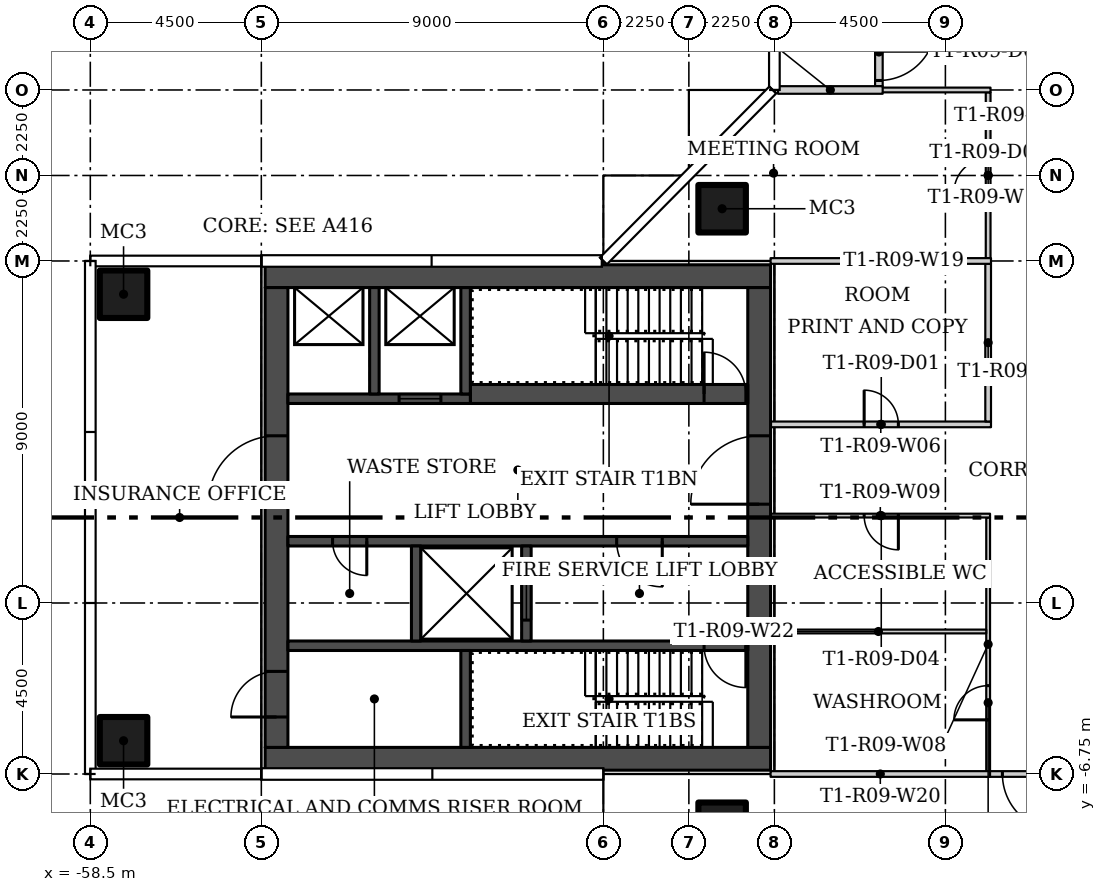
"""IFC4 building model, lengths in metres.
Left out: names, types, materials, properties, quantities, classifications, styles, units other than length and angle.
Written with IfcOpenShell. Run it as: python <this file> out.ifc"""

import sys

from ifc_helpers import new_model, si_unit, direction, frame, frame_2d, origin, origin_2d, place, context, subcontext, project, spatial, rectangle, hollow_rectangle, extrude, element, fill, save


model = new_model("IFC4")
c1 = context("Model", 3, precision=1e-05, world=origin(), true_north=direction((0.0, 1.0)))
c2 = subcontext(c1, "Body", "Model", "MODEL_VIEW")
j1 = project(units=[si_unit("LENGTHUNIT", "METRE"), si_unit("PLANEANGLEUNIT", "RADIAN")], contexts=[c1])
p1 = place(None, origin())
s1 = spatial("IfcSite", under=j1, at=p1, CompositionType="ELEMENT")
p2 = place(p1, origin())
s2 = spatial("IfcBuilding", under=s1, at=p2, CompositionType="ELEMENT")
p3 = place(p2, frame((0.0, 0.0, 89.7)))
s3 = spatial("IfcBuildingStorey", under=s2, at=p3, CompositionType="ELEMENT", Elevation=89.7)
for number, where in (
    (1, (-41.875, 8.125, 0.0)),
    (2, (-41.875, -8.125, 0.0)),
    (3, (-57.625, -5.875, 0.0)),
    (4, (-57.625, 5.875, 0.0)),
):
    element("IfcColumn", number, at=place(p3, frame(where)), inside=s3, PredefinedType="COLUMN", context=c2, shape_type="SweptSolid", body=[
        extrude(hollow_rectangle(XDim=1.25, YDim=1.25, WallThickness=0.05, at=origin_2d()), origin(), (0.0, 0.0, 1.0), 3.55),
    ])
p4 = place(p3, frame((-40.6, 2.45, 0.0)))
e5 = element("IfcWall", 5, at=p4, inside=s3, PredefinedType="PARTITIONING", context=c2, shape_type="SweptSolid", body=[
    extrude(rectangle(XDim=5.8, YDim=0.15, at=frame_2d((2.9, 0.0))), origin(), (0.0, 0.0, 1.0), 3.55),
])
p5 = place(p4, frame((2.462, 0.0, 0.0)))
e6 = element("IfcOpeningElement", 6, at=p5, cuts=e5, PredefinedType="OPENING", context=c2, shape_type="SweptSolid", body=[
    extrude(rectangle(XDim=0.9, YDim=2.1, at=frame_2d((0.45, 1.05))), frame((0.0, 0.085, 0.0), z_axis=(0.0, -1.0, 0.0), x_axis=(1.0, 0.0, 0.0)), (0.0, 0.0, 1.0), 0.17),
])
p6 = place(p3, frame((-34.875, 2.525, 0.0), z_axis=(0.0, 0.0, 1.0), x_axis=(0.0, 1.0, 0.0)))
e7 = element("IfcWall", 7, at=p6, inside=s3, PredefinedType="PARTITIONING", context=c2, shape_type="SweptSolid", body=[
    extrude(rectangle(XDim=4.15, YDim=0.15, at=frame_2d((2.075, 0.0))), origin(), (0.0, 0.0, 1.0), 3.55),
])
p7 = place(p3, frame((-34.875, -6.675, 0.0), z_axis=(0.0, 0.0, 1.0), x_axis=(0.0, 1.0, 0.0)))
e8 = element("IfcWall", 8, at=p7, inside=s3, PredefinedType="PARTITIONING", context=c2, shape_type="SweptSolid", body=[
    extrude(rectangle(XDim=6.675, YDim=0.1, at=frame_2d((3.337, 0.0))), origin(), (0.0, 0.0, 1.0), 3.55),
])
p8 = place(p7, frame((1.35, 0.0, 0.0)))
e9 = element("IfcOpeningElement", 9, at=p8, cuts=e8, PredefinedType="OPENING", context=c2, shape_type="SweptSolid", body=[
    extrude(rectangle(XDim=0.9, YDim=2.1, at=frame_2d((0.45, 1.05))), frame((0.0, 0.06, 0.0), z_axis=(0.0, -1.0, 0.0), x_axis=(1.0, 0.0, 0.0)), (0.0, 0.0, 1.0), 0.12),
])
p9 = place(p3, frame((-34.825, 0.05, 0.0), z_axis=(0.0, 0.0, 1.0), x_axis=(-1.0, 0.0, 0.0)))
e10 = element("IfcWall", 10, at=p9, inside=s3, PredefinedType="PARTITIONING", context=c2, shape_type="SweptSolid", body=[
    extrude(rectangle(XDim=5.775, YDim=0.1, at=frame_2d((2.888, 0.0))), origin(), (0.0, 0.0, 1.0), 3.55),
])
p10 = place(p9, frame((2.413, 0.0, 0.0)))
e11 = element("IfcOpeningElement", 11, at=p10, cuts=e10, PredefinedType="OPENING", context=c2, shape_type="SweptSolid", body=[
    extrude(rectangle(XDim=0.9, YDim=2.1, at=frame_2d((0.45, 1.05))), frame((0.0, 0.06, 0.0), z_axis=(0.0, -1.0, 0.0), x_axis=(1.0, 0.0, 0.0)), (0.0, 0.0, 1.0), 0.12),
])
p11 = place(p3, frame((-34.875, 6.825, 0.0), z_axis=(0.0, 0.0, 1.0), x_axis=(0.0, 1.0, 0.0)))
e12 = element("IfcWall", 12, at=p11, inside=s3, PredefinedType="PARTITIONING", context=c2, shape_type="SweptSolid", body=[
    extrude(rectangle(XDim=4.363, YDim=0.125, at=frame_2d((2.181, 0.0))), origin(), (0.0, 0.0, 1.0), 3.55),
])
p12 = place(p11, frame((1.725, 0.0, 0.0)))
e13 = element("IfcOpeningElement", 13, at=p12, cuts=e12, PredefinedType="OPENING", context=c2, shape_type="SweptSolid", body=[
    extrude(rectangle(XDim=0.9, YDim=2.1, at=frame_2d((0.45, 1.05))), frame((0.0, 0.073, 0.0), z_axis=(0.0, -1.0, 0.0), x_axis=(1.0, 0.0, 0.0)), (0.0, 0.0, 1.0), 0.145),
])
p13 = place(p3, frame((-34.812, 11.25, 0.0), z_axis=(0.0, 0.0, 1.0), x_axis=(-1.0, 0.0, 0.0)))
e14 = element("IfcWall", 14, at=p13, inside=s3, PredefinedType="PARTITIONING", context=c2, shape_type="SweptSolid", body=[
    extrude(rectangle(XDim=3.038, YDim=0.125, at=frame_2d((1.519, 0.0))), origin(), (0.0, 0.0, 1.0), 3.55),
])
p14 = place(p3, frame((-37.75, 13.15, 0.0), z_axis=(0.0, 0.0, 1.0), x_axis=(0.0, -1.0, 0.0)))
e15 = element("IfcWall", 15, at=p14, inside=s3, PredefinedType="PARTITIONING", context=c2, shape_type="SweptSolid", body=[
    extrude(rectangle(XDim=1.8, YDim=0.2, at=frame_2d((0.9, 0.0))), origin(), (0.0, 0.0, 1.0), 3.55),
])
p15 = place(p14, frame((0.15, 0.0, 0.0)))
e16 = element("IfcOpeningElement", 16, at=p15, cuts=e15, PredefinedType="OPENING", context=c2, shape_type="SweptSolid", body=[
    extrude(rectangle(XDim=1.5, YDim=2.4, at=frame_2d((0.75, 1.2))), frame((0.0, 0.11, 0.0), z_axis=(0.0, -1.0, 0.0), x_axis=(1.0, 0.0, 0.0)), (0.0, 0.0, 1.0), 0.22),
])
p16 = place(p3, frame((-32.55, -6.75, 0.0), z_axis=(0.0, 0.0, 1.0), x_axis=(-1.0, 0.0, 0.0)))
e17 = element("IfcWall", 17, at=p16, inside=s3, PredefinedType="PARTITIONING", context=c2, shape_type="SweptSolid", body=[
    extrude(rectangle(XDim=2.375, YDim=0.15, at=frame_2d((1.188, 0.0))), origin(), (0.0, 0.0, 1.0), 3.55),
])
p17 = place(p16, frame((0.45, 0.0, 0.0)))
e18 = element("IfcOpeningElement", 18, at=p17, cuts=e17, PredefinedType="OPENING", context=c2, shape_type="SweptSolid", body=[
    extrude(rectangle(XDim=1.5, YDim=2.1, at=frame_2d((0.75, 1.05))), frame((0.0, 0.085, 0.0), z_axis=(0.0, -1.0, 0.0), x_axis=(1.0, 0.0, 0.0)), (0.0, 0.0, 1.0), 0.17),
])
p18 = place(p3, frame((-34.8, 6.75, 0.0), z_axis=(0.0, 0.0, 1.0), x_axis=(-1.0, 0.0, 0.0)))
e19 = element("IfcWall", 19, at=p18, inside=s3, PredefinedType="PARTITIONING", context=c2, shape_type="SweptSolid", body=[
    extrude(rectangle(XDim=5.8, YDim=0.15, at=frame_2d((2.9, 0.0))), origin(), (0.0, 0.0, 1.0), 3.55),
])
p19 = place(p3, frame((-40.6, -6.75, 0.0)))
e20 = element("IfcWall", 20, at=p19, inside=s3, PredefinedType="PARTITIONING", context=c2, shape_type="SweptSolid", body=[
    extrude(rectangle(XDim=5.775, YDim=0.15, at=frame_2d((2.888, 0.0))), origin(), (0.0, 0.0, 1.0), 3.55),
])
p20 = place(p3, frame((-34.925, -3.0, 0.0), z_axis=(0.0, 0.0, 1.0), x_axis=(-1.0, 0.0, 0.0)))
e21 = element("IfcWall", 21, at=p20, inside=s3, PredefinedType="PARTITIONING", context=c2, shape_type="SweptSolid", body=[
    extrude(rectangle(XDim=5.675, YDim=0.1, at=frame_2d((2.837, 0.0))), origin(), (0.0, 0.0, 1.0), 3.55),
])
p21 = place(p3, frame((-37.65, 11.25, 0.0), z_axis=(0.0, 0.0, 1.0), x_axis=(-1.0, 0.0, 0.0)))
e22 = element("IfcWall", 22, at=p21, inside=s3, PredefinedType="PARTITIONING", context=c2, shape_type="SweptSolid", body=[
    extrude(rectangle(XDim=2.755, YDim=0.2, at=frame_2d((1.377, 0.0))), origin(), (0.0, 0.0, 1.0), 3.55),
])
for number, where, z_axis, x_axis in (
    (23, (-40.6, -6.35, 0.0), (0.0, 0.0, 1.0), (-1.0, 0.0, 0.0)),
    (24, (-40.6, 6.35, 0.0), (0.0, 0.0, 1.0), (-1.0, 0.0, 0.0)),
):
    element("IfcWall", number, at=place(p3, frame(where, z_axis=z_axis, x_axis=x_axis)), inside=s3, PredefinedType="SHEAR", context=c2, shape_type="SweptSolid", body=[
        extrude(rectangle(XDim=13.3, YDim=0.6, at=frame_2d((6.65, 0.0))), origin(), (0.0, 0.0, 1.0), 3.55),
    ])
p22 = place(p3, frame((-40.9, -6.05, 0.0), z_axis=(0.0, 0.0, 1.0), x_axis=(0.0, 1.0, 0.0)))
e25 = element("IfcWall", 25, at=p22, inside=s3, PredefinedType="SHEAR", context=c2, shape_type="SweptSolid", body=[
    extrude(rectangle(XDim=12.1, YDim=0.6, at=frame_2d((6.05, 0.0))), origin(), (0.0, 0.0, 1.0), 3.55),
])
p23 = place(p22, frame((6.4, 0.0, 0.0)))
e26 = element("IfcOpeningElement", 26, at=p23, cuts=e25, PredefinedType="OPENING", context=c2, shape_type="SweptSolid", body=[
    extrude(rectangle(XDim=1.8, YDim=2.4, at=frame_2d((0.9, 1.2))), frame((0.0, 0.31, 0.0), z_axis=(0.0, -1.0, 0.0), x_axis=(1.0, 0.0, 0.0)), (0.0, 0.0, 1.0), 0.62),
])
p24 = place(p3, frame((-53.6, -6.05, 0.0), z_axis=(0.0, 0.0, 1.0), x_axis=(0.0, 1.0, 0.0)))
e27 = element("IfcWall", 27, at=p24, inside=s3, PredefinedType="SHEAR", context=c2, shape_type="SweptSolid", body=[
    extrude(rectangle(XDim=12.1, YDim=0.6, at=frame_2d((6.05, 0.0))), origin(), (0.0, 0.0, 1.0), 3.55),
])
p25 = place(p24, frame((0.8, 0.0, 0.0)))
e28 = element("IfcOpeningElement", 28, at=p25, cuts=e27, PredefinedType="OPENING", context=c2, shape_type="SweptSolid", body=[
    extrude(rectangle(XDim=1.2, YDim=2.1, at=frame_2d((0.6, 1.05))), frame((0.0, 0.31, 0.0), z_axis=(0.0, -1.0, 0.0), x_axis=(1.0, 0.0, 0.0)), (0.0, 0.0, 1.0), 0.62),
])
p26 = place(p24, frame((6.4, 0.0, 0.0)))
e29 = element("IfcOpeningElement", 29, at=p26, cuts=e27, PredefinedType="OPENING", context=c2, shape_type="SweptSolid", body=[
    extrude(rectangle(XDim=1.8, YDim=2.4, at=frame_2d((0.9, 1.2))), frame((0.0, 0.31, 0.0), z_axis=(0.0, -1.0, 0.0), x_axis=(1.0, 0.0, 0.0)), (0.0, 0.0, 1.0), 0.62),
])
p27 = place(p3, frame((-41.2, -3.375, 0.0), z_axis=(0.0, 0.0, 1.0), x_axis=(-1.0, 0.0, 0.0)))
e30 = element("IfcWall", 30, at=p27, inside=s3, PredefinedType="SHEAR", context=c2, shape_type="SweptSolid", body=[
    extrude(rectangle(XDim=12.1, YDim=0.25, at=frame_2d((6.05, 0.0))), origin(), (0.0, 0.0, 1.0), 3.55),
])
p28 = place(p27, frame((0.05, 0.0, 0.0)))
e31 = element("IfcOpeningElement", 31, at=p28, cuts=e30, PredefinedType="OPENING", context=c2, shape_type="SweptSolid", body=[
    extrude(rectangle(XDim=1.1, YDim=2.1, at=frame_2d((0.55, 1.05))), frame((0.0, 0.135, 0.0), z_axis=(0.0, -1.0, 0.0), x_axis=(1.0, 0.0, 0.0)), (0.0, 0.0, 1.0), 0.27),
])
p29 = place(p3, frame((-48.625, -6.05, 0.0), z_axis=(0.0, 0.0, 1.0), x_axis=(0.0, 1.0, 0.0)))
e32 = element("IfcWall", 32, at=p29, inside=s3, PredefinedType="SHEAR", context=c2, shape_type="SweptSolid", body=[
    extrude(rectangle(XDim=2.55, YDim=0.25, at=frame_2d((1.275, 0.0))), origin(), (0.0, 0.0, 1.0), 3.55),
])
p30 = place(p3, frame((-41.2, -0.625, 0.0), z_axis=(0.0, 0.0, 1.0), x_axis=(-1.0, 0.0, 0.0)))
e33 = element("IfcWall", 33, at=p30, inside=s3, PredefinedType="SHEAR", context=c2, shape_type="SweptSolid", body=[
    extrude(rectangle(XDim=12.1, YDim=0.25, at=frame_2d((6.05, 0.0))), origin(), (0.0, 0.0, 1.0), 3.55),
])
p31 = place(p30, frame((2.25, 0.0, 0.0)))
e34 = element("IfcOpeningElement", 34, at=p31, cuts=e33, PredefinedType="OPENING", context=c2, shape_type="SweptSolid", body=[
    extrude(rectangle(XDim=1.2, YDim=2.1, at=frame_2d((0.6, 1.05))), frame((0.0, 0.135, 0.0), z_axis=(0.0, -1.0, 0.0), x_axis=(1.0, 0.0, 0.0)), (0.0, 0.0, 1.0), 0.27),
])
p32 = place(p30, frame((10.025, 0.0, 0.0)))
e35 = element("IfcOpeningElement", 35, at=p32, cuts=e33, PredefinedType="OPENING", context=c2, shape_type="SweptSolid", body=[
    extrude(rectangle(XDim=0.9, YDim=2.1, at=frame_2d((0.45, 1.05))), frame((0.0, 0.135, 0.0), z_axis=(0.0, -1.0, 0.0), x_axis=(1.0, 0.0, 0.0)), (0.0, 0.0, 1.0), 0.27),
])
p33 = place(p3, frame((-47.025, -3.25, 0.0), z_axis=(0.0, 0.0, 1.0), x_axis=(0.0, 1.0, 0.0)))
e36 = element("IfcWall", 36, at=p33, inside=s3, PredefinedType="SHEAR", context=c2, shape_type="SweptSolid", body=[
    extrude(rectangle(XDim=2.5, YDim=0.25, at=frame_2d((1.25, 0.0))), origin(), (0.0, 0.0, 1.0), 3.55),
])
p34 = place(p33, frame((0.55, 0.0, 0.0)))
e37 = element("IfcOpeningElement", 37, at=p34, cuts=e36, PredefinedType="OPENING", context=c2, shape_type="SweptSolid", body=[
    extrude(rectangle(XDim=1.4, YDim=2.4, at=frame_2d((0.7, 1.2))), frame((0.0, 0.135, 0.0), z_axis=(0.0, -1.0, 0.0), x_axis=(1.0, 0.0, 0.0)), (0.0, 0.0, 1.0), 0.27),
])
p35 = place(p3, frame((-49.925, -3.25, 0.0), z_axis=(0.0, 0.0, 1.0), x_axis=(0.0, 1.0, 0.0)))
e38 = element("IfcWall", 38, at=p35, inside=s3, PredefinedType="SHEAR", context=c2, shape_type="SweptSolid", body=[
    extrude(rectangle(XDim=2.5, YDim=0.25, at=frame_2d((1.25, 0.0))), origin(), (0.0, 0.0, 1.0), 3.55),
])
p36 = place(p3, frame((-48.5, 3.25, 0.0)))
e39 = element("IfcWall", 39, at=p36, inside=s3, PredefinedType="SHEAR", context=c2, shape_type="SweptSolid", body=[
    extrude(rectangle(XDim=7.3, YDim=0.5, at=frame_2d((3.65, 0.0))), origin(), (0.0, 0.0, 1.0), 3.55),
])
p37 = place(p36, frame((6.15, 0.0, 0.0)))
e40 = element("IfcOpeningElement", 40, at=p37, cuts=e39, PredefinedType="OPENING", context=c2, shape_type="SweptSolid", body=[
    extrude(rectangle(XDim=1.1, YDim=2.1, at=frame_2d((0.55, 1.05))), frame((0.0, 0.26, 0.0), z_axis=(0.0, -1.0, 0.0), x_axis=(1.0, 0.0, 0.0)), (0.0, 0.0, 1.0), 0.52),
])
p38 = place(p3, frame((-48.5, 3.125, 0.0), z_axis=(0.0, 0.0, 1.0), x_axis=(-1.0, 0.0, 0.0)))
e41 = element("IfcWall", 41, at=p38, inside=s3, PredefinedType="SHEAR", context=c2, shape_type="SweptSolid", body=[
    extrude(rectangle(XDim=4.8, YDim=0.25, at=frame_2d((2.4, 0.0))), origin(), (0.0, 0.0, 1.0), 3.55),
])
p39 = place(p38, frame((0.775, 0.0, 0.0)))
e42 = element("IfcOpeningElement", 42, at=p39, cuts=e41, PredefinedType="OPENING", context=c2, shape_type="SweptSolid", body=[
    extrude(rectangle(XDim=1.1, YDim=2.1, at=frame_2d((0.55, 1.05))), frame((0.0, 0.135, 0.0), z_axis=(0.0, -1.0, 0.0), x_axis=(1.0, 0.0, 0.0)), (0.0, 0.0, 1.0), 0.27),
])
for number, where, z_axis, x_axis in (
    (43, (-48.625, 3.25, 0.0), (0.0, 0.0, 1.0), (0.0, 1.0, 0.0)),
    (44, (-51.025, 3.25, 0.0), (0.0, 0.0, 1.0), (0.0, 1.0, 0.0)),
):
    element("IfcWall", number, at=place(p3, frame(where, z_axis=z_axis, x_axis=x_axis)), inside=s3, PredefinedType="SHEAR", context=c2, shape_type="SweptSolid", body=[
        extrude(rectangle(XDim=2.8, YDim=0.25, at=frame_2d((1.4, 0.0))), origin(), (0.0, 0.0, 1.0), 3.55),
    ])
p40 = place(p5, origin())
e45 = element("IfcDoor", 45, at=p40, inside=s3, OperationType="SINGLE_SWING_RIGHT", PredefinedType="DOOR", context=c2, shape_type="SweptSolid", body=[
    extrude(rectangle(XDim=0.9, YDim=2.1, at=frame_2d((0.45, 1.05))), frame((0.0, 0.025, 0.0), z_axis=(0.0, -1.0, 0.0), x_axis=(1.0, 0.0, 0.0)), (0.0, 0.0, 1.0), 0.05),
])
fill(e6, e45)
p41 = place(p15, origin())
e46 = element("IfcDoor", 46, at=p41, inside=s3, OperationType="DOUBLE_DOOR_SINGLE_SWING", PredefinedType="DOOR", context=c2, shape_type="SweptSolid", body=[
    extrude(rectangle(XDim=1.5, YDim=2.4, at=frame_2d((0.75, 1.2))), frame((0.0, 0.025, 0.0), z_axis=(0.0, -1.0, 0.0), x_axis=(1.0, 0.0, 0.0)), (0.0, 0.0, 1.0), 0.05),
])
fill(e16, e46)
p42 = place(p8, origin())
e47 = element("IfcDoor", 47, at=p42, inside=s3, OperationType="SINGLE_SWING_RIGHT", PredefinedType="DOOR", context=c2, shape_type="SweptSolid", body=[
    extrude(rectangle(XDim=0.9, YDim=2.1, at=frame_2d((0.45, 1.05))), frame((0.0, 0.025, 0.0), z_axis=(0.0, -1.0, 0.0), x_axis=(1.0, 0.0, 0.0)), (0.0, 0.0, 1.0), 0.05),
])
fill(e9, e47)
p43 = place(p10, origin())
e48 = element("IfcDoor", 48, at=p43, inside=s3, OperationType="SINGLE_SWING_LEFT", PredefinedType="DOOR", context=c2, shape_type="SweptSolid", body=[
    extrude(rectangle(XDim=0.9, YDim=2.1, at=frame_2d((0.45, 1.05))), frame((0.0, 0.025, 0.0), z_axis=(0.0, -1.0, 0.0), x_axis=(1.0, 0.0, 0.0)), (0.0, 0.0, 1.0), 0.05),
])
fill(e11, e48)
p44 = place(p12, origin())
e49 = element("IfcDoor", 49, at=p44, inside=s3, OperationType="SINGLE_SWING_LEFT", PredefinedType="DOOR", context=c2, shape_type="SweptSolid", body=[
    extrude(rectangle(XDim=0.9, YDim=2.1, at=frame_2d((0.45, 1.05))), frame((0.0, 0.025, 0.0), z_axis=(0.0, -1.0, 0.0), x_axis=(1.0, 0.0, 0.0)), (0.0, 0.0, 1.0), 0.05),
])
fill(e13, e49)
p45 = place(p17, origin())
e50 = element("IfcDoor", 50, at=p45, inside=s3, OperationType="DOUBLE_DOOR_SINGLE_SWING", PredefinedType="DOOR", context=c2, shape_type="SweptSolid", body=[
    extrude(rectangle(XDim=1.5, YDim=2.1, at=frame_2d((0.75, 1.05))), frame((0.0, 0.025, 0.0), z_axis=(0.0, -1.0, 0.0), x_axis=(1.0, 0.0, 0.0)), (0.0, 0.0, 1.0), 0.05),
])
fill(e18, e50)
p46 = place(p23, origin())
e51 = element("IfcDoor", 51, at=p46, inside=s3, OperationType="DOUBLE_DOOR_SINGLE_SWING", PredefinedType="DOOR", context=c2, shape_type="SweptSolid", body=[
    extrude(rectangle(XDim=1.8, YDim=2.4, at=frame_2d((0.9, 1.2))), frame((0.0, 0.025, 0.0), z_axis=(0.0, -1.0, 0.0), x_axis=(1.0, 0.0, 0.0)), (0.0, 0.0, 1.0), 0.05),
])
fill(e26, e51)
p47 = place(p25, origin())
e52 = element("IfcDoor", 52, at=p47, inside=s3, OperationType="SINGLE_SWING_LEFT", PredefinedType="DOOR", context=c2, shape_type="SweptSolid", body=[
    extrude(rectangle(XDim=1.2, YDim=2.1, at=frame_2d((0.6, 1.05))), frame((0.0, 0.025, 0.0), z_axis=(0.0, -1.0, 0.0), x_axis=(1.0, 0.0, 0.0)), (0.0, 0.0, 1.0), 0.05),
])
fill(e28, e52)
p48 = place(p26, origin())
e53 = element("IfcDoor", 53, at=p48, inside=s3, OperationType="DOUBLE_DOOR_SINGLE_SWING", PredefinedType="DOOR", context=c2, shape_type="SweptSolid", body=[
    extrude(rectangle(XDim=1.8, YDim=2.4, at=frame_2d((0.9, 1.2))), frame((0.0, 0.025, 0.0), z_axis=(0.0, -1.0, 0.0), x_axis=(1.0, 0.0, 0.0)), (0.0, 0.0, 1.0), 0.05),
])
fill(e29, e53)
p49 = place(p28, origin())
e54 = element("IfcDoor", 54, at=p49, inside=s3, OperationType="SINGLE_SWING_LEFT", PredefinedType="DOOR", context=c2, shape_type="SweptSolid", body=[
    extrude(rectangle(XDim=1.1, YDim=2.1, at=frame_2d((0.55, 1.05))), frame((0.0, 0.025, 0.0), z_axis=(0.0, -1.0, 0.0), x_axis=(1.0, 0.0, 0.0)), (0.0, 0.0, 1.0), 0.05),
])
fill(e31, e54)
p50 = place(p31, origin())
e55 = element("IfcDoor", 55, at=p50, inside=s3, OperationType="SINGLE_SWING_LEFT", PredefinedType="DOOR", context=c2, shape_type="SweptSolid", body=[
    extrude(rectangle(XDim=1.2, YDim=2.1, at=frame_2d((0.6, 1.05))), frame((0.0, 0.025, 0.0), z_axis=(0.0, -1.0, 0.0), x_axis=(1.0, 0.0, 0.0)), (0.0, 0.0, 1.0), 0.05),
])
fill(e34, e55)
p51 = place(p32, origin())
e56 = element("IfcDoor", 56, at=p51, inside=s3, OperationType="SINGLE_SWING_RIGHT", PredefinedType="DOOR", context=c2, shape_type="SweptSolid", body=[
    extrude(rectangle(XDim=0.9, YDim=2.1, at=frame_2d((0.45, 1.05))), frame((0.0, 0.025, 0.0), z_axis=(0.0, -1.0, 0.0), x_axis=(1.0, 0.0, 0.0)), (0.0, 0.0, 1.0), 0.05),
])
fill(e35, e56)
p52 = place(p34, origin())
e57 = element("IfcDoor", 57, at=p52, inside=s3, OperationType="SLIDING_TO_LEFT", PredefinedType="DOOR", context=c2, shape_type="SweptSolid", body=[
    extrude(rectangle(XDim=1.4, YDim=2.4, at=frame_2d((0.7, 1.2))), frame((0.0, 0.025, 0.0), z_axis=(0.0, -1.0, 0.0), x_axis=(1.0, 0.0, 0.0)), (0.0, 0.0, 1.0), 0.05),
])
fill(e37, e57)
p53 = place(p37, origin())
e58 = element("IfcDoor", 58, at=p53, inside=s3, OperationType="SINGLE_SWING_RIGHT", PredefinedType="DOOR", context=c2, shape_type="SweptSolid", body=[
    extrude(rectangle(XDim=1.1, YDim=2.1, at=frame_2d((0.55, 1.05))), frame((0.0, 0.025, 0.0), z_axis=(0.0, -1.0, 0.0), x_axis=(1.0, 0.0, 0.0)), (0.0, 0.0, 1.0), 0.05),
])
fill(e40, e58)
p54 = place(p39, origin())
e59 = element("IfcDoor", 59, at=p54, inside=s3, OperationType="SLIDING_TO_LEFT", PredefinedType="DOOR", context=c2, shape_type="SweptSolid", body=[
    extrude(rectangle(XDim=1.1, YDim=2.1, at=frame_2d((0.55, 1.05))), frame((0.0, 0.025, 0.0), z_axis=(0.0, -1.0, 0.0), x_axis=(1.0, 0.0, 0.0)), (0.0, 0.0, 1.0), 0.05),
])
fill(e42, e59)
save(model, sys.argv[1])
